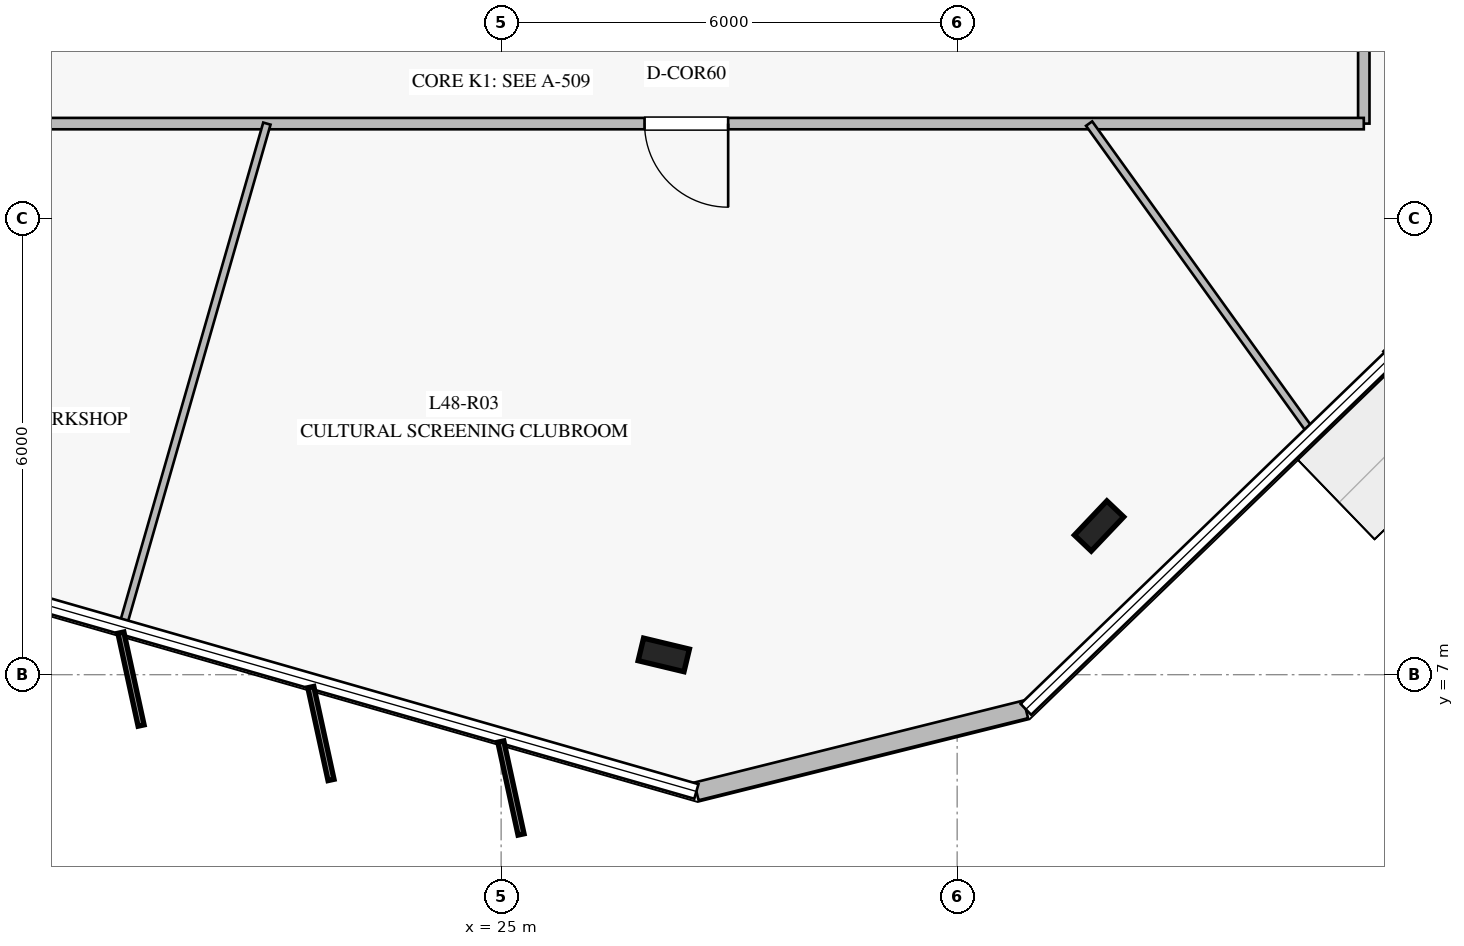
"""IFC4 building model, lengths in metres.
Left out: names, types, materials, properties, quantities, classifications, styles, units other than length and angle.
Written with IfcOpenShell. Run it as: python <this file> out.ifc"""

import sys

from ifc_helpers import new_model, si_unit, direction, frame, frame_2d, origin, origin_2d, place, context, subcontext, project, spatial, rectangle, i_section, extrude, element, fill, save


model = new_model("IFC4")
c1 = context("Model", 3, precision=1e-05, world=origin(), true_north=direction((0.0, 1.0)))
c2 = subcontext(c1, "Body", "Model", "MODEL_VIEW")
j1 = project(units=[si_unit("LENGTHUNIT", "METRE"), si_unit("PLANEANGLEUNIT", "RADIAN")], contexts=[c1])
p1 = place(None, origin())
s1 = spatial("IfcSite", under=j1, at=p1, CompositionType="ELEMENT")
p2 = place(p1, origin())
s2 = spatial("IfcBuilding", under=s1, at=p2, CompositionType="ELEMENT")
p3 = place(p2, frame((0.0, 0.0, 200.8)))
s3 = spatial("IfcBuildingStorey", under=s2, at=p3, CompositionType="ELEMENT", Elevation=200.8)
for number, where, z_axis, x_axis in (
    (1, (27.14, 7.26, 0.0), (0.0, 0.0, 1.0), (-0.972, 0.233, 0.0)),
    (2, (32.867, 8.956, 0.0), (0.0, 0.0, 1.0), (0.688, 0.725, 0.0)),
):
    element("IfcColumn", number, at=place(p3, frame(where, z_axis=z_axis, x_axis=x_axis)), inside=s3, PredefinedType="COLUMN", context=c2, shape_type="SweptSolid", body=[
        extrude(i_section(OverallWidth=0.305, OverallDepth=0.62, WebThickness=0.021, FlangeThickness=0.04, at=origin_2d()), origin(), (0.0, 0.0, 1.0), 4.0),
    ])
p4 = place(p3, frame((27.569, 5.464, 0.0), z_axis=(0.0, 0.0, 1.0), x_axis=(0.970347888564, 0.241712587921, 0.0)))
e3 = element("IfcWall", 3, at=p4, inside=s3, PredefinedType="STANDARD", context=c2, shape_type="SweptSolid", body=[
    extrude(rectangle(XDim=4.468, YDim=0.24, at=frame_2d((2.234, 0.0))), origin(), (0.0, 0.0, 1.0), 3.78),
])
p5 = place(p3, frame((36.691, 11.167, 0.0), z_axis=(0.0, 0.0, 1.0), x_axis=(0.719310294305, 0.694688923552, 0.0)))
e4 = element("IfcWall", 4, at=p5, inside=s3, PredefinedType="STANDARD", context=c2, shape_type="SweptSolid", body=[
    extrude(rectangle(XDim=2.4, YDim=0.24, at=frame_2d((1.2, 0.0))), origin(), (0.0, 0.0, 1.0), 3.78),
])
p6 = place(p5, frame((0.4, 0.0, 0.0)))
e5 = element("IfcOpeningElement", 5, at=p6, cuts=e4, PredefinedType="OPENING", context=c2, shape_type="SweptSolid", body=[
    extrude(rectangle(XDim=1.6, YDim=2.25, at=frame_2d((0.8, 1.125))), frame((0.0, 0.13, 0.0), z_axis=(0.0, -1.0, 0.0), x_axis=(1.0, 0.0, 0.0)), (0.0, 0.0, 1.0), 0.26),
])
p7 = place(p3, frame((36.35, 35.75, 0.0), z_axis=(0.0, 0.0, 1.0), x_axis=(0.0, -1.0, 0.0)))
e6 = element("IfcWall", 6, at=p7, inside=s3, PredefinedType="PARTITIONING", context=c2, shape_type="SweptSolid", body=[
    extrude(rectangle(XDim=21.5, YDim=0.15, at=frame_2d((10.75, 0.0))), origin(), (0.0, 0.0, 1.0), 3.05),
])
p8 = place(p7, frame((13.969, 0.0, 0.0)))
e7 = element("IfcOpeningElement", 7, at=p8, cuts=e6, PredefinedType="OPENING", context=c2, shape_type="SweptSolid", body=[
    extrude(rectangle(XDim=1.1, YDim=2.2, at=frame_2d((0.55, 1.1))), frame((0.0, 0.085, 0.0), z_axis=(0.0, -1.0, 0.0), x_axis=(1.0, 0.0, 0.0)), (0.0, 0.0, 1.0), 0.17),
])
p9 = place(p3, frame((36.35, 14.25, 0.0), z_axis=(0.0, 0.0, 1.0), x_axis=(-1.0, 0.0, 0.0)))
e8 = element("IfcWall", 8, at=p9, inside=s3, PredefinedType="PARTITIONING", context=c2, shape_type="SweptSolid", body=[
    extrude(rectangle(XDim=22.7, YDim=0.15, at=frame_2d((11.35, 0.0))), origin(), (0.0, 0.0, 1.0), 3.28),
])
p10 = place(p9, frame((17.843, 0.0, 0.0)))
e9 = element("IfcOpeningElement", 9, at=p10, cuts=e8, PredefinedType="OPENING", context=c2, shape_type="SweptSolid", body=[
    extrude(rectangle(XDim=1.1, YDim=2.2, at=frame_2d((0.55, 1.1))), frame((0.0, 0.085, 0.0), z_axis=(0.0, -1.0, 0.0), x_axis=(1.0, 0.0, 0.0)), (0.0, 0.0, 1.0), 0.17),
])
p11 = place(p9, frame((8.363, 0.0, 0.0)))
e10 = element("IfcOpeningElement", 10, at=p11, cuts=e8, PredefinedType="OPENING", context=c2, shape_type="SweptSolid", body=[
    extrude(rectangle(XDim=1.1, YDim=2.2, at=frame_2d((0.55, 1.1))), frame((0.0, 0.085, 0.0), z_axis=(0.0, -1.0, 0.0), x_axis=(1.0, 0.0, 0.0)), (0.0, 0.0, 1.0), 0.17),
])
p12 = place(p3, frame((21.918, 14.25, 0.0), z_axis=(0.0, 0.0, 1.0), x_axis=(-0.27574381978, -0.961231161507, 0.0)))
e11 = element("IfcWall", 11, at=p12, inside=s3, PredefinedType="MOVABLE", context=c2, shape_type="SweptSolid", body=[
    extrude(rectangle(XDim=6.872, YDim=0.1, at=frame_2d((3.436, 0.0))), origin(), (0.0, 0.0, 1.0), 3.18),
])
p13 = place(p3, frame((32.736, 14.25, 0.0), z_axis=(0.0, 0.0, 1.0), x_axis=(0.584181233506, -0.81162324167, 0.0)))
e12 = element("IfcWall", 12, at=p13, inside=s3, PredefinedType="MOVABLE", context=c2, shape_type="SweptSolid", body=[
    extrude(rectangle(XDim=5.0, YDim=0.1, at=frame_2d((2.5, 0.0))), origin(), (0.0, 0.0, 1.0), 3.18),
])
p14 = place(p11, origin())
e13 = element("IfcDoor", 13, at=p14, inside=s3, OperationType="SINGLE_SWING_LEFT", PredefinedType="DOOR", context=c2, shape_type="SweptSolid", body=[
    extrude(rectangle(XDim=1.1, YDim=2.2, at=frame_2d((0.55, 1.1))), frame((0.0, 0.025, 0.0), z_axis=(0.0, -1.0, 0.0), x_axis=(1.0, 0.0, 0.0)), (0.0, 0.0, 1.0), 0.05),
])
fill(e10, e13)
save(model, sys.argv[1])
